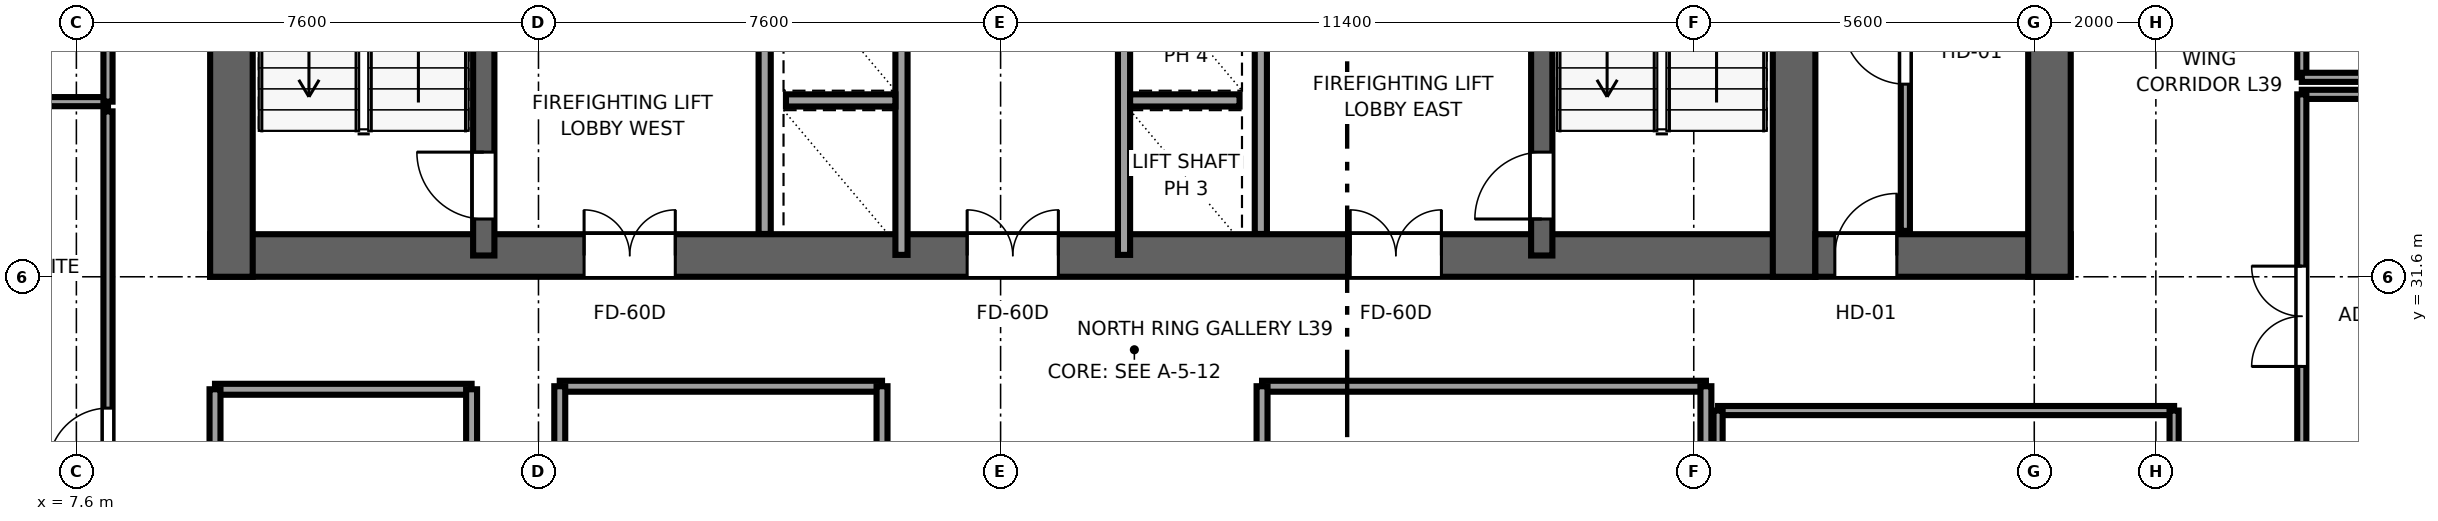
"""IFC4 building model, lengths in metres.
Left out: names, types, materials, properties, quantities, classifications, styles, units other than length and angle.
Written with IfcOpenShell. Run it as: python <this file> out.ifc"""

import sys

from ifc_helpers import new_model, si_unit, direction, frame, frame_2d, origin, place, context, subcontext, project, spatial, rectangle, extrude, source, transform, mapped, element, fill, save


model = new_model("IFC4")
c1 = context("Model", 3, precision=1e-05, world=origin(), true_north=direction((0.0, 1.0)))
c2 = subcontext(c1, "Body", "Model", "MODEL_VIEW")
j1 = project(units=[si_unit("LENGTHUNIT", "METRE"), si_unit("PLANEANGLEUNIT", "RADIAN")], contexts=[c1])
p1 = place(None, origin())
s1 = spatial("IfcSite", under=j1, at=p1, CompositionType="ELEMENT")
p2 = place(p1, origin())
s2 = spatial("IfcBuilding", under=s1, at=p2, CompositionType="ELEMENT")
p3 = place(p2, frame((0.0, 0.0, 150.6)))
s3 = spatial("IfcBuildingStorey", under=s2, at=p3, CompositionType="ELEMENT", Elevation=150.6)
p4 = place(p3, frame((9.8, 31.95, 0.0), z_axis=(0.0, 0.0, 1.0), x_axis=(1.0, 0.0, 0.0)))
e1 = element("IfcWall", 1, at=p4, inside=s3, PredefinedType="SHEAR", context=c2, shape_type="SweptSolid", body=[
    extrude(rectangle(XDim=26.4, YDim=0.7, at=frame_2d((13.2, 0.0))), origin(), (0.0, 0.0, 1.0), 3.55),
])
p5 = place(p4, frame((7.65, 0.0, 0.0), z_axis=(0.0, 0.0, 1.0), x_axis=(-1.0, 0.0, 0.0)))
e2 = element("IfcOpeningElement", 2, at=p5, cuts=e1, PredefinedType="OPENING", context=c2, shape_type="SweptSolid", body=[
    extrude(rectangle(XDim=1.5, YDim=2.04, at=frame_2d((0.75, 1.02))), frame((0.0, 0.36, 0.0), z_axis=(0.0, -1.0, 0.0), x_axis=(1.0, 0.0, 0.0)), (0.0, 0.0, 1.0), 0.72),
])
p6 = place(p4, frame((13.95, 0.0, 0.0), z_axis=(0.0, 0.0, 1.0), x_axis=(-1.0, 0.0, 0.0)))
e3 = element("IfcOpeningElement", 3, at=p6, cuts=e1, PredefinedType="OPENING", context=c2, shape_type="SweptSolid", body=[
    extrude(rectangle(XDim=1.5, YDim=2.04, at=frame_2d((0.75, 1.02))), frame((0.0, 0.36, 0.0), z_axis=(0.0, -1.0, 0.0), x_axis=(1.0, 0.0, 0.0)), (0.0, 0.0, 1.0), 0.72),
])
p7 = place(p4, frame((20.25, 0.0, 0.0), z_axis=(0.0, 0.0, 1.0), x_axis=(-1.0, 0.0, 0.0)))
e4 = element("IfcOpeningElement", 4, at=p7, cuts=e1, PredefinedType="OPENING", context=c2, shape_type="SweptSolid", body=[
    extrude(rectangle(XDim=1.5, YDim=2.04, at=frame_2d((0.75, 1.02))), frame((0.0, 0.36, 0.0), z_axis=(0.0, -1.0, 0.0), x_axis=(1.0, 0.0, 0.0)), (0.0, 0.0, 1.0), 0.72),
])
for number, where, z_axis, x_axis in (
    (5, (10.15, 31.6, 0.0), (0.0, 0.0, 1.0), (0.0, 1.0, 0.0)),
    (6, (35.85, 31.6, 0.0), (0.0, 0.0, 1.0), (0.0, 1.0, 0.0)),
):
    element("IfcWall", number, at=place(p3, frame(where, z_axis=z_axis, x_axis=x_axis)), inside=s3, PredefinedType="SHEAR", context=c2, shape_type="SweptSolid", body=[
        extrude(rectangle(XDim=13.6, YDim=0.7, at=frame_2d((6.8, 0.0))), origin(), (0.0, 0.0, 1.0), 3.55),
    ])
p8 = place(p3, frame((14.3, 31.95, 0.0), z_axis=(0.0, 0.0, 1.0), x_axis=(0.0, 1.0, 0.0)))
e7 = element("IfcWall", 7, at=p8, inside=s3, PredefinedType="SHEAR", context=c2, shape_type="SweptSolid", body=[
    extrude(rectangle(XDim=12.9, YDim=0.35, at=frame_2d((6.45, 0.0))), origin(), (0.0, 0.0, 1.0), 3.55),
])
p9 = place(p8, frame((0.6, 0.0, 0.0)))
e8 = element("IfcOpeningElement", 8, at=p9, cuts=e7, PredefinedType="OPENING", context=c2, shape_type="SweptSolid", body=[
    extrude(rectangle(XDim=1.1, YDim=2.12, at=frame_2d((0.55, 1.06))), frame((0.0, 0.185, 0.0), z_axis=(0.0, -1.0, 0.0), x_axis=(1.0, 0.0, 0.0)), (0.0, 0.0, 1.0), 0.37),
])
p10 = place(p3, frame((31.7, 31.95, 0.0), z_axis=(0.0, 0.0, 1.0), x_axis=(0.0, 1.0, 0.0)))
e9 = element("IfcWall", 9, at=p10, inside=s3, PredefinedType="SHEAR", context=c2, shape_type="SweptSolid", body=[
    extrude(rectangle(XDim=12.9, YDim=0.35, at=frame_2d((6.45, 0.0))), origin(), (0.0, 0.0, 1.0), 3.55),
])
p11 = place(p10, frame((1.7, 0.0, 0.0), z_axis=(0.0, 0.0, 1.0), x_axis=(-1.0, 0.0, 0.0)))
e10 = element("IfcOpeningElement", 10, at=p11, cuts=e9, PredefinedType="OPENING", context=c2, shape_type="SweptSolid", body=[
    extrude(rectangle(XDim=1.1, YDim=2.12, at=frame_2d((0.55, 1.06))), frame((0.0, 0.185, 0.0), z_axis=(0.0, -1.0, 0.0), x_axis=(1.0, 0.0, 0.0)), (0.0, 0.0, 1.0), 0.37),
])
p12 = place(p3, frame((36.2, 31.95, 0.0), z_axis=(0.0, 0.0, 1.0), x_axis=(1.0, 0.0, 0.0)))
e11 = element("IfcWall", 11, at=p12, inside=s3, PredefinedType="SHEAR", context=c2, shape_type="SweptSolid", body=[
    extrude(rectangle(XDim=4.2, YDim=0.7, at=frame_2d((2.1, 0.0))), origin(), (0.0, 0.0, 1.0), 3.55),
])
p13 = place(p12, frame((1.34, 0.0, 0.0), z_axis=(0.0, 0.0, 1.0), x_axis=(-1.0, 0.0, 0.0)))
e12 = element("IfcOpeningElement", 12, at=p13, cuts=e11, PredefinedType="OPENING", context=c2, shape_type="SweptSolid", body=[
    extrude(rectangle(XDim=1.02, YDim=2.03, at=frame_2d((0.51, 1.015))), frame((0.0, 0.36, 0.0), z_axis=(0.0, -1.0, 0.0), x_axis=(1.0, 0.0, 0.0)), (0.0, 0.0, 1.0), 0.72),
])
p14 = place(p3, frame((40.05, 31.6, 0.0), z_axis=(0.0, 0.0, 1.0), x_axis=(0.0, 1.0, 0.0)))
e13 = element("IfcWall", 13, at=p14, inside=s3, PredefinedType="SHEAR", context=c2, shape_type="SweptSolid", body=[
    extrude(rectangle(XDim=13.6, YDim=0.7, at=frame_2d((6.8, 0.0))), origin(), (0.0, 0.0, 1.0), 3.55),
])
for number, where, z_axis, x_axis in (
    (14, (18.92, 32.304, 0.0), (0.0, 0.0, 1.0), (0.0, 1.0, 0.0)),
    (15, (27.08, 32.304, 0.0), (0.0, 0.0, 1.0), (0.0, 1.0, 0.0)),
):
    element("IfcWall", number, at=place(p3, frame(where, z_axis=z_axis, x_axis=x_axis)), inside=s3, PredefinedType="SOLIDWALL", context=c2, shape_type="SweptSolid", body=[
        extrude(rectangle(XDim=3.846, YDim=0.2, at=frame_2d((1.923, 0.0))), origin(), (0.0, 0.0, 1.0), 3.37),
    ])
p15 = place(p3, frame((21.17, 31.96, 0.0), z_axis=(0.0, 0.0, 1.0), x_axis=(0.0, 1.0, 0.0)))
e16 = element("IfcWall", 16, at=p15, inside=s3, PredefinedType="SOLIDWALL", context=c2, shape_type="SweptSolid", body=[
    extrude(rectangle(XDim=12.58, YDim=0.2, at=frame_2d((6.29, 0.0))), origin(), (0.0, 0.0, 1.0), 3.37),
])
p16 = place(p15, frame((5.74, 0.0, 0.0)))
e17 = element("IfcOpeningElement", 17, at=p16, cuts=e16, PredefinedType="OPENING", context=c2, shape_type="SweptSolid", body=[
    extrude(rectangle(XDim=1.1, YDim=2.12, at=frame_2d((0.55, 1.06))), frame((0.0, 0.11, 0.0), z_axis=(0.0, -1.0, 0.0), x_axis=(1.0, 0.0, 0.0)), (0.0, 0.0, 1.0), 0.22),
])
p17 = place(p15, frame((8.24, 0.0, 0.0)))
e18 = element("IfcOpeningElement", 18, at=p17, cuts=e16, PredefinedType="OPENING", context=c2, shape_type="SweptSolid", body=[
    extrude(rectangle(XDim=1.1, YDim=2.12, at=frame_2d((0.55, 1.06))), frame((0.0, 0.11, 0.0), z_axis=(0.0, -1.0, 0.0), x_axis=(1.0, 0.0, 0.0)), (0.0, 0.0, 1.0), 0.22),
])
p18 = place(p3, frame((19.27, 34.5, 0.0), z_axis=(0.0, 0.0, 1.0), x_axis=(1.0, 0.0, 0.0)))
e19 = element("IfcWall", 19, at=p18, inside=s3, PredefinedType="SOLIDWALL", context=c2, shape_type="SweptSolid", body=[
    extrude(rectangle(XDim=1.8, YDim=0.2, at=frame_2d((0.9, 0.0))), origin(), (0.0, 0.0, 1.0), 3.37),
])
p19 = place(p3, frame((24.83, 31.96, 0.0), z_axis=(0.0, 0.0, 1.0), x_axis=(0.0, 1.0, 0.0)))
e20 = element("IfcWall", 20, at=p19, inside=s3, PredefinedType="SOLIDWALL", context=c2, shape_type="SweptSolid", body=[
    extrude(rectangle(XDim=12.58, YDim=0.2, at=frame_2d((6.29, 0.0))), origin(), (0.0, 0.0, 1.0), 3.37),
])
p20 = place(p19, frame((5.74, 0.0, 0.0)))
e21 = element("IfcOpeningElement", 21, at=p20, cuts=e20, PredefinedType="OPENING", context=c2, shape_type="SweptSolid", body=[
    extrude(rectangle(XDim=1.1, YDim=2.12, at=frame_2d((0.55, 1.06))), frame((0.0, 0.11, 0.0), z_axis=(0.0, -1.0, 0.0), x_axis=(1.0, 0.0, 0.0)), (0.0, 0.0, 1.0), 0.22),
])
p21 = place(p19, frame((8.24, 0.0, 0.0)))
e22 = element("IfcOpeningElement", 22, at=p21, cuts=e20, PredefinedType="OPENING", context=c2, shape_type="SweptSolid", body=[
    extrude(rectangle(XDim=1.1, YDim=2.12, at=frame_2d((0.55, 1.06))), frame((0.0, 0.11, 0.0), z_axis=(0.0, -1.0, 0.0), x_axis=(1.0, 0.0, 0.0)), (0.0, 0.0, 1.0), 0.22),
])
p22 = place(p3, frame((24.93, 34.5, 0.0), z_axis=(0.0, 0.0, 1.0), x_axis=(1.0, 0.0, 0.0)))
e23 = element("IfcWall", 23, at=p22, inside=s3, PredefinedType="SOLIDWALL", context=c2, shape_type="SweptSolid", body=[
    extrude(rectangle(XDim=1.8, YDim=0.2, at=frame_2d((0.9, 0.0))), origin(), (0.0, 0.0, 1.0), 3.37),
])
p23 = place(p3, frame((3.005, 34.48, 0.0), z_axis=(0.0, 0.0, 1.0), x_axis=(1.0, 0.0, 0.0)))
e24 = element("IfcWall", 24, at=p23, inside=s3, PredefinedType="PARTITIONING", context=c2, shape_type="SweptSolid", body=[
    extrude(rectangle(XDim=5.115, YDim=0.15, at=frame_2d((2.558, 0.0))), origin(), (0.0, 0.0, 1.0), 3.37),
])
p24 = place(p3, frame((37.68, 32.355, 0.0), z_axis=(0.0, 0.0, 1.0), x_axis=(0.0, 1.0, 0.0)))
e25 = element("IfcWall", 25, at=p24, inside=s3, PredefinedType="PARTITIONING", context=c2, shape_type="SweptSolid", body=[
    extrude(rectangle(XDim=5.845, YDim=0.15, at=frame_2d((2.922, 0.0))), origin(), (0.0, 0.0, 1.0), 3.37),
])
p25 = place(p24, frame((2.413, 0.0, 0.0)))
e26 = element("IfcOpeningElement", 26, at=p25, cuts=e25, PredefinedType="OPENING", context=c2, shape_type="SweptSolid", body=[
    extrude(rectangle(XDim=1.02, YDim=2.03, at=frame_2d((0.51, 1.015))), frame((0.0, 0.085, 0.0), z_axis=(0.0, -1.0, 0.0), x_axis=(1.0, 0.0, 0.0)), (0.0, 0.0, 1.0), 0.17),
])
p26 = place(p3, frame((8.12, 23.58, 0.0), z_axis=(0.0, 0.0, 1.0), x_axis=(0.0, 1.0, 0.0)))
e27 = element("IfcWall", 27, at=p26, inside=s3, PredefinedType="PARTITIONING", context=c2, shape_type="SweptSolid", body=[
    extrude(rectangle(XDim=10.74, YDim=0.15, at=frame_2d((5.37, 0.0))), origin(), (0.0, 0.0, 1.0), 3.37),
])
p27 = place(p26, frame((4.88, 0.0, 0.0)))
e28 = element("IfcOpeningElement", 28, at=p27, cuts=e27, PredefinedType="OPENING", context=c2, shape_type="SweptSolid", body=[
    extrude(rectangle(XDim=0.98, YDim=2.12, at=frame_2d((0.49, 1.06))), frame((0.0, 0.085, 0.0), z_axis=(0.0, -1.0, 0.0), x_axis=(1.0, 0.0, 0.0)), (0.0, 0.0, 1.0), 0.17),
])
p28 = place(p3, frame((8.12, 34.48, 0.0), z_axis=(0.0, 0.0, 1.0), x_axis=(0.0, 1.0, 0.0)))
e29 = element("IfcWall", 29, at=p28, inside=s3, PredefinedType="PARTITIONING", context=c2, shape_type="SweptSolid", body=[
    extrude(rectangle(XDim=11.115, YDim=0.15, at=frame_2d((5.558, 0.0))), origin(), (0.0, 0.0, 1.0), 3.37),
])
p29 = place(p28, frame((4.32, 0.0, 0.0)))
e30 = element("IfcOpeningElement", 30, at=p29, cuts=e29, PredefinedType="OPENING", context=c2, shape_type="SweptSolid", body=[
    extrude(rectangle(XDim=0.98, YDim=2.12, at=frame_2d((0.49, 1.06))), frame((0.0, 0.085, 0.0), z_axis=(0.0, -1.0, 0.0), x_axis=(1.0, 0.0, 0.0)), (0.0, 0.0, 1.0), 0.17),
])
p30 = place(p3, frame((44.2, 34.6, 0.0), z_axis=(0.0, 0.0, 1.0), x_axis=(1.0, 0.0, 0.0)))
e31 = element("IfcWall", 31, at=p30, inside=s3, PredefinedType="PARTITIONING", context=c2, shape_type="SweptSolid", body=[
    extrude(rectangle(XDim=9.795, YDim=0.15, at=frame_2d((4.897, 0.0))), origin(), (0.0, 0.0, 1.0), 3.37),
])
p31 = place(p3, frame((44.2, 27.3, 0.0), z_axis=(0.0, 0.0, 1.0), x_axis=(0.0, 1.0, 0.0)))
e32 = element("IfcWall", 32, at=p31, inside=s3, PredefinedType="PARTITIONING", context=c2, shape_type="SweptSolid", body=[
    extrude(rectangle(XDim=7.3, YDim=0.15, at=frame_2d((3.65, 0.0))), origin(), (0.0, 0.0, 1.0), 3.37),
])
p32 = place(p31, frame((2.825, 0.0, 0.0)))
e33 = element("IfcOpeningElement", 33, at=p32, cuts=e32, PredefinedType="OPENING", context=c2, shape_type="SweptSolid", body=[
    extrude(rectangle(XDim=1.65, YDim=2.15, at=frame_2d((0.825, 1.075))), frame((0.0, 0.085, 0.0), z_axis=(0.0, -1.0, 0.0), x_axis=(1.0, 0.0, 0.0)), (0.0, 0.0, 1.0), 0.17),
])
p33 = place(p3, frame((44.2, 34.88, 0.0), z_axis=(0.0, 0.0, 1.0), x_axis=(0.0, 1.0, 0.0)))
e34 = element("IfcWall", 34, at=p33, inside=s3, PredefinedType="PARTITIONING", context=c2, shape_type="SweptSolid", body=[
    extrude(rectangle(XDim=9.33, YDim=0.15, at=frame_2d((4.665, 0.0))), origin(), (0.0, 0.0, 1.0), 3.37),
])
p34 = place(p33, frame((4.12, 0.0, 0.0)))
e35 = element("IfcOpeningElement", 35, at=p34, cuts=e34, PredefinedType="OPENING", context=c2, shape_type="SweptSolid", body=[
    extrude(rectangle(XDim=0.98, YDim=2.12, at=frame_2d((0.49, 1.06))), frame((0.0, 0.085, 0.0), z_axis=(0.0, -1.0, 0.0), x_axis=(1.0, 0.0, 0.0)), (0.0, 0.0, 1.0), 0.17),
])
p35 = place(p3, frame((44.2, 34.88, 0.0), z_axis=(0.0, 0.0, 1.0), x_axis=(1.0, 0.0, 0.0)))
e36 = element("IfcWall", 36, at=p35, inside=s3, PredefinedType="PARTITIONING", context=c2, shape_type="SweptSolid", body=[
    extrude(rectangle(XDim=7.43, YDim=0.15, at=frame_2d((3.715, 0.0))), origin(), (0.0, 0.0, 1.0), 3.37),
])
p36 = place(p3, frame((9.88, 29.75, 0.0), z_axis=(0.0, 0.0, 1.0), x_axis=(1.0, 0.0, 0.0)))
e37 = element("IfcWall", 37, at=p36, inside=s3, PredefinedType="PARTITIONING", context=c2, shape_type="SweptSolid", body=[
    extrude(rectangle(XDim=4.22, YDim=0.18, at=frame_2d((2.11, 0.0))), origin(), (0.0, 0.0, 1.0), 3.37),
])
for number, where, z_axis, x_axis in (
    (38, (9.88, 23.5, 0.0), (0.0, 0.0, 1.0), (0.0, 1.0, 0.0)),
    (39, (14.1, 23.5, 0.0), (0.0, 0.0, 1.0), (0.0, 1.0, 0.0)),
):
    element("IfcWall", number, at=place(p3, frame(where, z_axis=z_axis, x_axis=x_axis)), inside=s3, PredefinedType="PARTITIONING", context=c2, shape_type="SweptSolid", body=[
        extrude(rectangle(XDim=6.25, YDim=0.18, at=frame_2d((3.125, 0.0))), origin(), (0.0, 0.0, 1.0), 3.37),
    ])
p37 = place(p3, frame((27.1, 29.8, 0.0), z_axis=(0.0, 0.0, 1.0), x_axis=(1.0, 0.0, 0.0)))
e40 = element("IfcWall", 40, at=p37, inside=s3, PredefinedType="PARTITIONING", context=c2, shape_type="SweptSolid", body=[
    extrude(rectangle(XDim=7.3, YDim=0.18, at=frame_2d((3.65, 0.0))), origin(), (0.0, 0.0, 1.0), 3.37),
])
for number, where, z_axis, x_axis in (
    (41, (27.1, 23.5, 0.0), (0.0, 0.0, 1.0), (0.0, 1.0, 0.0)),
    (42, (34.4, 23.5, 0.0), (0.0, 0.0, 1.0), (0.0, 1.0, 0.0)),
):
    element("IfcWall", number, at=place(p3, frame(where, z_axis=z_axis, x_axis=x_axis)), inside=s3, PredefinedType="PARTITIONING", context=c2, shape_type="SweptSolid", body=[
        extrude(rectangle(XDim=6.3, YDim=0.18, at=frame_2d((3.15, 0.0))), origin(), (0.0, 0.0, 1.0), 3.37),
    ])
p38 = place(p3, frame((15.55, 29.8, 0.0), z_axis=(0.0, 0.0, 1.0), x_axis=(1.0, 0.0, 0.0)))
e43 = element("IfcWall", 43, at=p38, inside=s3, PredefinedType="PARTITIONING", context=c2, shape_type="SweptSolid", body=[
    extrude(rectangle(XDim=5.3, YDim=0.18, at=frame_2d((2.65, 0.0))), origin(), (0.0, 0.0, 1.0), 3.37),
])
for number, where, z_axis, x_axis in (
    (44, (15.55, 23.5, 0.0), (0.0, 0.0, 1.0), (0.0, 1.0, 0.0)),
    (45, (20.85, 23.5, 0.0), (0.0, 0.0, 1.0), (0.0, 1.0, 0.0)),
):
    element("IfcWall", number, at=place(p3, frame(where, z_axis=z_axis, x_axis=x_axis)), inside=s3, PredefinedType="PARTITIONING", context=c2, shape_type="SweptSolid", body=[
        extrude(rectangle(XDim=6.3, YDim=0.18, at=frame_2d((3.15, 0.0))), origin(), (0.0, 0.0, 1.0), 3.37),
    ])
p39 = place(p3, frame((34.6, 29.4, 0.0), z_axis=(0.0, 0.0, 1.0), x_axis=(1.0, 0.0, 0.0)))
e46 = element("IfcWall", 46, at=p39, inside=s3, PredefinedType="PARTITIONING", context=c2, shape_type="SweptSolid", body=[
    extrude(rectangle(XDim=7.5, YDim=0.15, at=frame_2d((3.75, 0.0))), origin(), (0.0, 0.0, 1.0), 2.16),
])
p40 = place(p3, frame((34.6, 23.5, 0.0), z_axis=(0.0, 0.0, 1.0), x_axis=(0.0, 1.0, 0.0)))
e47 = element("IfcWall", 47, at=p40, inside=s3, PredefinedType="PARTITIONING", context=c2, shape_type="SweptSolid", body=[
    extrude(rectangle(XDim=5.9, YDim=0.15, at=frame_2d((2.95, 0.0))), origin(), (0.0, 0.0, 1.0), 3.37),
])
p41 = place(p3, frame((42.1, 23.5, 0.0), z_axis=(0.0, 0.0, 1.0), x_axis=(0.0, 1.0, 0.0)))
e48 = element("IfcWall", 48, at=p41, inside=s3, PredefinedType="PARTITIONING", context=c2, shape_type="SweptSolid", body=[
    extrude(rectangle(XDim=5.9, YDim=0.15, at=frame_2d((2.95, 0.0))), origin(), (0.0, 0.0, 1.0), 2.16),
])
m1 = source(origin(), c2, "Body", "SweptSolid", [
    extrude(rectangle(XDim=1.1, YDim=2.12, at=frame_2d((0.55, 1.06))), frame((0.0, 0.025, 0.0), z_axis=(0.0, -1.0, 0.0), x_axis=(1.0, 0.0, 0.0)), (0.0, 0.0, 1.0), 0.05),
])
p42 = place(p9, origin())
e49 = element("IfcDoor", 49, at=p42, inside=s3, OperationType="SINGLE_SWING_RIGHT", PredefinedType="DOOR", context=c2, shape_type="MappedRepresentation", body=[
    mapped(m1, transform((0.0, 0.0, 0.0), x_axis=(1.0, 0.0, 0.0), y_axis=(0.0, 1.0, 0.0), z_axis=(0.0, 0.0, 1.0), scale=1.0)),
])
fill(e8, e49)
p43 = place(p11, origin())
e50 = element("IfcDoor", 50, at=p43, inside=s3, OperationType="SINGLE_SWING_LEFT", PredefinedType="DOOR", context=c2, shape_type="MappedRepresentation", body=[
    mapped(m1, transform((0.0, 0.0, 0.0), x_axis=(1.0, 0.0, 0.0), y_axis=(0.0, 1.0, 0.0), z_axis=(0.0, 0.0, 1.0), scale=1.0)),
])
fill(e10, e50)
m2 = source(origin(), c2, "Body", "SweptSolid", [
    extrude(rectangle(XDim=1.5, YDim=2.04, at=frame_2d((0.75, 1.02))), frame((0.0, 0.025, 0.0), z_axis=(0.0, -1.0, 0.0), x_axis=(1.0, 0.0, 0.0)), (0.0, 0.0, 1.0), 0.05),
])
p44 = place(p5, origin())
e51 = element("IfcDoor", 51, at=p44, inside=s3, OperationType="DOUBLE_DOOR_SINGLE_SWING", PredefinedType="DOOR", context=c2, shape_type="MappedRepresentation", body=[
    mapped(m2, transform((0.0, 0.0, 0.0), x_axis=(1.0, 0.0, 0.0), y_axis=(0.0, 1.0, 0.0), z_axis=(0.0, 0.0, 1.0), scale=1.0)),
])
fill(e2, e51)
p45 = place(p6, origin())
e52 = element("IfcDoor", 52, at=p45, inside=s3, OperationType="DOUBLE_DOOR_SINGLE_SWING", PredefinedType="DOOR", context=c2, shape_type="MappedRepresentation", body=[
    mapped(m2, transform((0.0, 0.0, 0.0), x_axis=(1.0, 0.0, 0.0), y_axis=(0.0, 1.0, 0.0), z_axis=(0.0, 0.0, 1.0), scale=1.0)),
])
fill(e3, e52)
p46 = place(p7, origin())
e53 = element("IfcDoor", 53, at=p46, inside=s3, OperationType="DOUBLE_DOOR_SINGLE_SWING", PredefinedType="DOOR", context=c2, shape_type="MappedRepresentation", body=[
    mapped(m2, transform((0.0, 0.0, 0.0), x_axis=(1.0, 0.0, 0.0), y_axis=(0.0, 1.0, 0.0), z_axis=(0.0, 0.0, 1.0), scale=1.0)),
])
fill(e4, e53)
m3 = source(origin(), c2, "Body", "SweptSolid", [
    extrude(rectangle(XDim=1.02, YDim=2.03, at=frame_2d((0.51, 1.015))), frame((0.0, 0.025, 0.0), z_axis=(0.0, -1.0, 0.0), x_axis=(1.0, 0.0, 0.0)), (0.0, 0.0, 1.0), 0.05),
])
p47 = place(p13, origin())
e54 = element("IfcDoor", 54, at=p47, inside=s3, OperationType="SINGLE_SWING_RIGHT", PredefinedType="DOOR", context=c2, shape_type="MappedRepresentation", body=[
    mapped(m3, transform((0.0, 0.0, 0.0), x_axis=(1.0, 0.0, 0.0), y_axis=(0.0, 1.0, 0.0), z_axis=(0.0, 0.0, 1.0), scale=1.0)),
])
fill(e12, e54)
p48 = place(p25, origin())
e55 = element("IfcDoor", 55, at=p48, inside=s3, OperationType="SINGLE_SWING_RIGHT", PredefinedType="DOOR", context=c2, shape_type="MappedRepresentation", body=[
    mapped(m3, transform((0.0, 0.0, 0.0), x_axis=(1.0, 0.0, 0.0), y_axis=(0.0, 1.0, 0.0), z_axis=(0.0, 0.0, 1.0), scale=1.0)),
])
fill(e26, e55)
m4 = source(origin(), c2, "Body", "SweptSolid", [
    extrude(rectangle(XDim=0.98, YDim=2.12, at=frame_2d((0.49, 1.06))), frame((0.0, 0.025, 0.0), z_axis=(0.0, -1.0, 0.0), x_axis=(1.0, 0.0, 0.0)), (0.0, 0.0, 1.0), 0.05),
])
p49 = place(p27, origin())
e56 = element("IfcDoor", 56, at=p49, inside=s3, OperationType="SINGLE_SWING_LEFT", PredefinedType="DOOR", context=c2, shape_type="MappedRepresentation", body=[
    mapped(m4, transform((0.0, 0.0, 0.0), x_axis=(1.0, 0.0, 0.0), y_axis=(0.0, 1.0, 0.0), z_axis=(0.0, 0.0, 1.0), scale=1.0)),
])
fill(e28, e56)
m5 = source(origin(), c2, "Body", "SweptSolid", [
    extrude(rectangle(XDim=1.65, YDim=2.15, at=frame_2d((0.825, 1.075))), frame((0.0, 0.025, 0.0), z_axis=(0.0, -1.0, 0.0), x_axis=(1.0, 0.0, 0.0)), (0.0, 0.0, 1.0), 0.05),
])
p50 = place(p32, origin())
e57 = element("IfcDoor", 57, at=p50, inside=s3, OperationType="DOUBLE_DOOR_SINGLE_SWING", PredefinedType="DOOR", context=c2, shape_type="MappedRepresentation", body=[
    mapped(m5, transform((0.0, 0.0, 0.0), x_axis=(1.0, 0.0, 0.0), y_axis=(0.0, 1.0, 0.0), z_axis=(0.0, 0.0, 1.0), scale=1.0)),
])
fill(e33, e57)
save(model, sys.argv[1])
